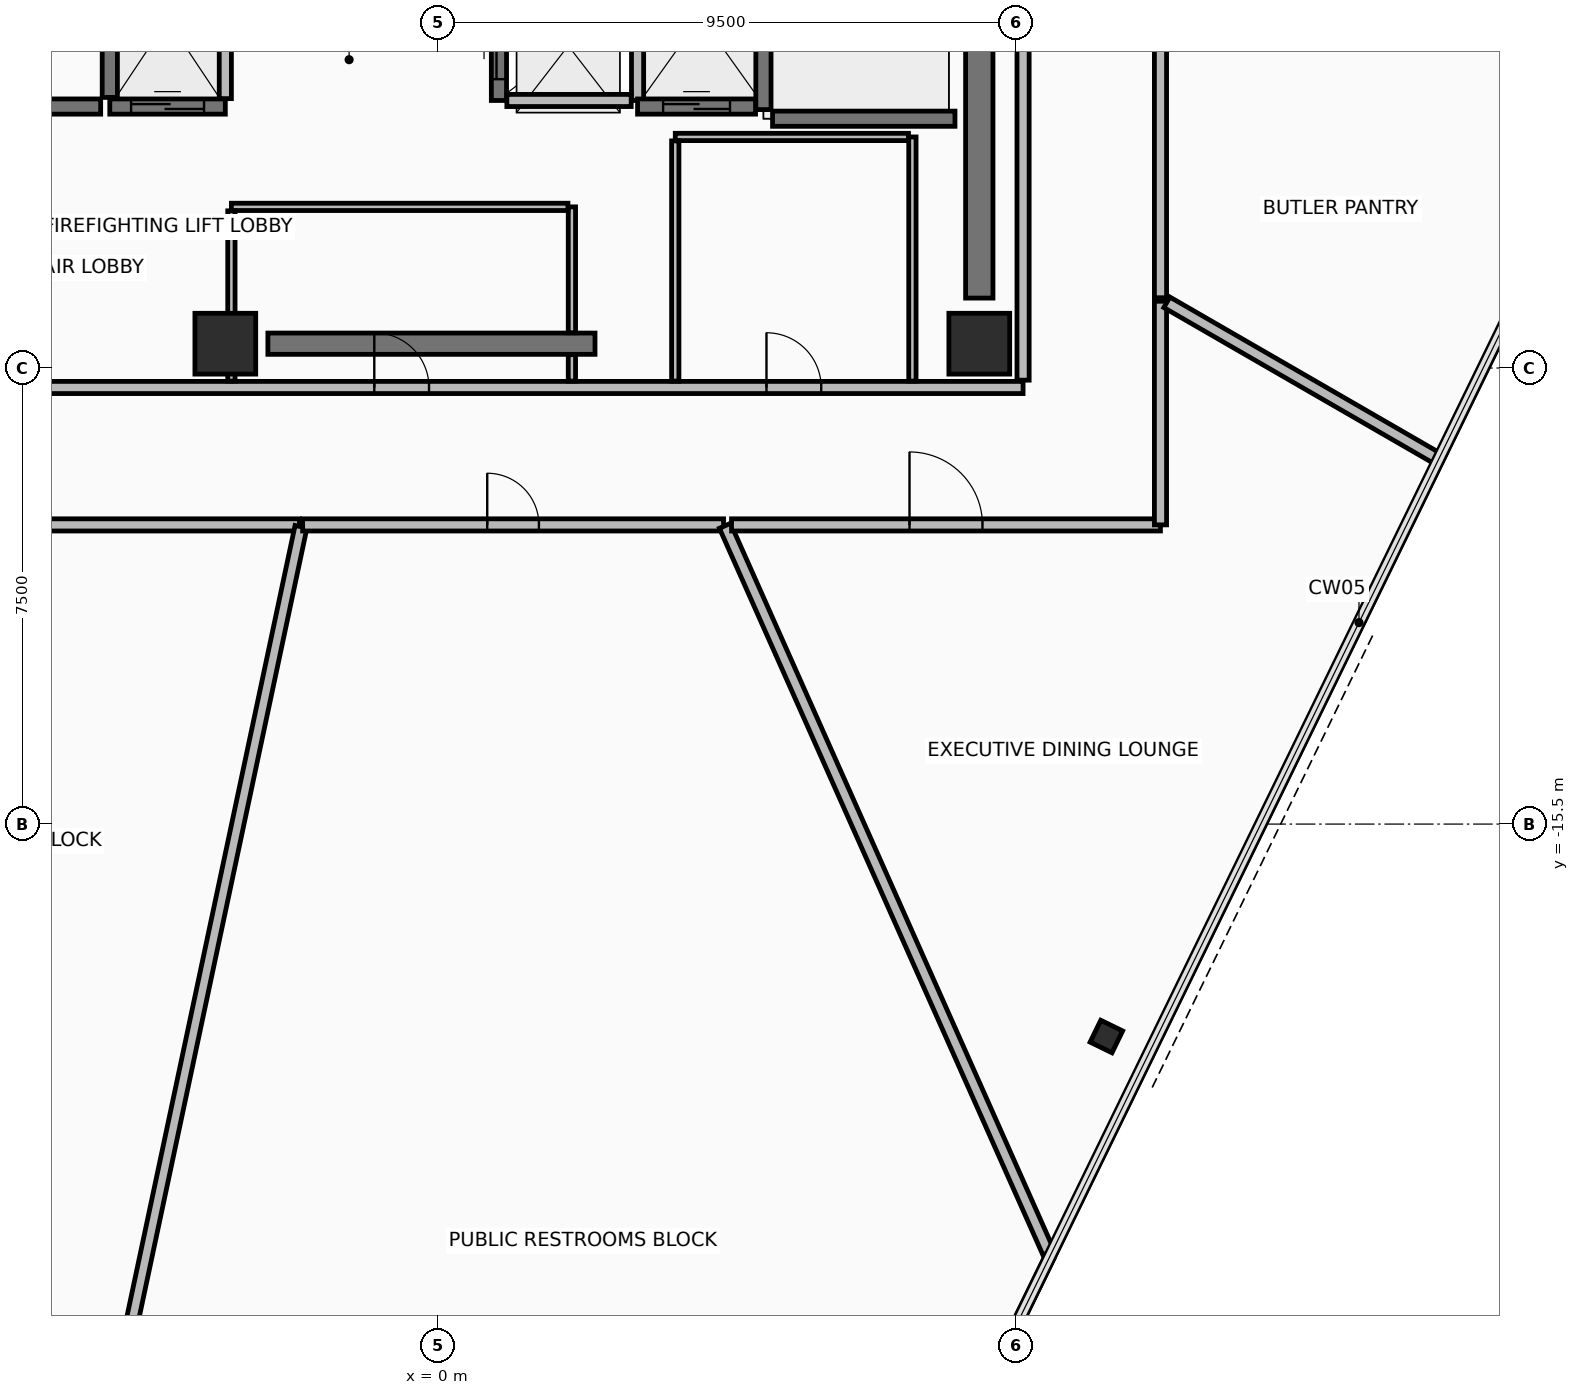
"""IFC4 building model, lengths in metres.
Left out: names, types, materials, properties, quantities, classifications, styles, units other than length and angle.
Written with IfcOpenShell. Run it as: python <this file> out.ifc"""

import sys

from ifc_helpers import new_model, si_unit, direction, frame, frame_2d, origin, origin_2d, place, context, subcontext, project, spatial, rectangle, hollow_rectangle, extrude, element, fill, save


model = new_model("IFC4")
c1 = context("Model", 3, precision=1e-05, world=origin(), true_north=direction((0.0, 1.0)))
c2 = subcontext(c1, "Body", "Model", "MODEL_VIEW")
j1 = project(units=[si_unit("LENGTHUNIT", "METRE"), si_unit("PLANEANGLEUNIT", "RADIAN")], contexts=[c1])
p1 = place(None, origin())
s1 = spatial("IfcSite", under=j1, at=p1, CompositionType="ELEMENT")
p2 = place(p1, origin())
s2 = spatial("IfcBuilding", under=s1, at=p2, CompositionType="ELEMENT")
p3 = place(p2, frame((0.0, 0.0, 260.6)))
s3 = spatial("IfcBuildingStorey", under=s2, at=p3, CompositionType="ELEMENT", Elevation=260.6)
for number, where, z_axis, x_axis in (
    (1, (-3.5, -7.6, 0.0), (0.0, 0.0, 1.0), (1.0, 0.0, 0.0)),
    (2, (8.9, -7.6, 0.0), (0.0, 0.0, 1.0), (1.0, 0.0, 0.0)),
):
    element("IfcColumn", number, at=place(p3, frame(where, z_axis=z_axis, x_axis=x_axis)), inside=s3, PredefinedType="COLUMN", context=c2, shape_type="SweptSolid", body=[
        extrude(rectangle(XDim=1.0, YDim=1.0, at=origin_2d()), origin(), (0.0, 0.0, 1.0), 3.6),
    ])
p4 = place(p3, frame((10.99, -18.994, 0.0), z_axis=(0.0, 0.0, 1.0), x_axis=(0.43837271548, 0.898793281196, 0.0)))
e3 = element("IfcColumn", 3, at=p4, inside=s3, PredefinedType="COLUMN", context=c2, shape_type="SweptSolid", body=[
    extrude(hollow_rectangle(XDim=0.4, YDim=0.4, WallThickness=0.025, at=origin_2d()), origin(), (0.0, 0.0, 1.0), 3.6),
])
p5 = place(p3, frame((-2.8, -7.6, 0.0), z_axis=(0.0, 0.0, 1.0), x_axis=(1.0, 0.0, 0.0)))
e4 = element("IfcWall", 4, at=p5, inside=s3, PredefinedType="SHEAR", context=c2, shape_type="SweptSolid", body=[
    extrude(rectangle(XDim=5.38, YDim=0.35, at=frame_2d((2.69, 0.0))), origin(), (0.0, 0.0, 1.0), 3.42),
])
p6 = place(p3, frame((8.9, -6.85, 0.0), z_axis=(0.0, 0.0, 1.0), x_axis=(0.0, 1.0, 0.0)))
e5 = element("IfcWall", 5, at=p6, inside=s3, PredefinedType="SHEAR", context=c2, shape_type="SweptSolid", body=[
    extrude(rectangle(XDim=10.7, YDim=0.45, at=frame_2d((5.35, 0.0))), origin(), (0.0, 0.0, 1.0), 3.42),
])
p7 = place(p3, frame((-9.62, -8.32, 0.0), z_axis=(0.0, 0.0, 1.0), x_axis=(1.0, 0.0, 0.0)))
e6 = element("IfcWall", 6, at=p7, inside=s3, PredefinedType="PARTITIONING", context=c2, shape_type="SweptSolid", body=[
    extrude(rectangle(XDim=19.24, YDim=0.2, at=frame_2d((9.62, 0.0))), origin(), (0.0, 0.0, 1.0), 2.915),
])
p8 = place(p7, frame((8.57, 0.0, 0.0)))
e7 = element("IfcOpeningElement", 7, at=p8, cuts=e6, PredefinedType="OPENING", context=c2, shape_type="SweptSolid", body=[
    extrude(rectangle(XDim=0.9, YDim=2.1, at=frame_2d((0.45, 1.05))), frame((0.0, 0.11, 0.0), z_axis=(0.0, -1.0, 0.0), x_axis=(1.0, 0.0, 0.0)), (0.0, 0.0, 1.0), 0.22),
])
p9 = place(p7, frame((15.02, 0.0, 0.0)))
e8 = element("IfcOpeningElement", 8, at=p9, cuts=e6, PredefinedType="OPENING", context=c2, shape_type="SweptSolid", body=[
    extrude(rectangle(XDim=0.9, YDim=2.1, at=frame_2d((0.45, 1.05))), frame((0.0, 0.11, 0.0), z_axis=(0.0, -1.0, 0.0), x_axis=(1.0, 0.0, 0.0)), (0.0, 0.0, 1.0), 0.22),
])
p10 = place(p3, frame((9.62, -8.2, 0.0), z_axis=(0.0, 0.0, 1.0), x_axis=(0.0, 1.0, 0.0)))
e9 = element("IfcWall", 9, at=p10, inside=s3, PredefinedType="PARTITIONING", context=c2, shape_type="SweptSolid", body=[
    extrude(rectangle(XDim=16.4, YDim=0.2, at=frame_2d((8.2, 0.0))), origin(), (0.0, 0.0, 1.0), 2.915),
])
p11 = place(p10, frame((12.65, 0.0, 0.0)))
e10 = element("IfcOpeningElement", 10, at=p11, cuts=e9, PredefinedType="OPENING", context=c2, shape_type="SweptSolid", body=[
    extrude(rectangle(XDim=1.1, YDim=2.15, at=frame_2d((0.55, 1.075))), frame((0.0, 0.11, 0.0), z_axis=(0.0, -1.0, 0.0), x_axis=(1.0, 0.0, 0.0)), (0.0, 0.0, 1.0), 0.22),
])
p12 = place(p3, frame((-5.4, -3.55, 0.0), z_axis=(0.0, 0.0, 1.0), x_axis=(0.0, 1.0, 0.0)))
e11 = element("IfcWall", 11, at=p12, inside=s3, PredefinedType="SHEAR", context=c2, shape_type="SweptSolid", body=[
    extrude(rectangle(XDim=7.3, YDim=0.25, at=frame_2d((3.65, 0.0))), origin(), (0.0, 0.0, 1.0), 3.42),
])
p13 = place(p3, frame((-8.5, -3.7, 0.0), z_axis=(0.0, 0.0, 1.0), x_axis=(1.0, 0.0, 0.0)))
e12 = element("IfcWall", 12, at=p13, inside=s3, PredefinedType="SHEAR", context=c2, shape_type="SweptSolid", body=[
    extrude(rectangle(XDim=2.95, YDim=0.25, at=frame_2d((1.475, 0.0))), origin(), (0.0, 0.0, 1.0), 3.42),
])
p14 = place(p13, frame((0.9, 0.0, 0.0)))
e13 = element("IfcOpeningElement", 13, at=p14, cuts=e12, PredefinedType="OPENING", context=c2, shape_type="SweptSolid", body=[
    extrude(rectangle(XDim=1.1, YDim=2.15, at=frame_2d((0.55, 1.075))), frame((0.0, 0.135, 0.0), z_axis=(0.0, -1.0, 0.0), x_axis=(1.0, 0.0, 0.0)), (0.0, 0.0, 1.0), 0.27),
])
p15 = place(p3, frame((5.35, -3.75, 0.0), z_axis=(0.0, 0.0, 1.0), x_axis=(0.0, 1.0, 0.0)))
e14 = element("IfcWall", 14, at=p15, inside=s3, PredefinedType="SHEAR", context=c2, shape_type="SweptSolid", body=[
    extrude(rectangle(XDim=7.3, YDim=0.25, at=frame_2d((3.65, 0.0))), origin(), (0.0, 0.0, 1.0), 3.42),
])
p16 = place(p3, frame((5.5, -3.9, 0.0), z_axis=(0.0, 0.0, 1.0), x_axis=(1.0, 0.0, 0.0)))
e15 = element("IfcWall", 15, at=p16, inside=s3, PredefinedType="SHEAR", context=c2, shape_type="SweptSolid", body=[
    extrude(rectangle(XDim=3.0, YDim=0.25, at=frame_2d((1.5, 0.0))), origin(), (0.0, 0.0, 1.0), 3.42),
])
p17 = place(p3, frame((1.0, -3.6, 0.0), z_axis=(0.0, 0.0, 1.0), x_axis=(0.0, 1.0, 0.0)))
e16 = element("IfcWall", 16, at=p17, inside=s3, PredefinedType="SHEAR", context=c2, shape_type="SweptSolid", body=[
    extrude(rectangle(XDim=1.8, YDim=0.25, at=frame_2d((0.9, 0.0))), origin(), (0.0, 0.0, 1.0), 3.42),
])
p18 = place(p17, frame((0.35, 0.0, 0.0)))
e17 = element("IfcOpeningElement", 17, at=p18, cuts=e16, PredefinedType="OPENING", context=c2, shape_type="SweptSolid", body=[
    extrude(rectangle(XDim=1.1, YDim=2.2, at=frame_2d((0.55, 1.1))), frame((0.0, 0.135, 0.0), z_axis=(0.0, -1.0, 0.0), x_axis=(1.0, 0.0, 0.0)), (0.0, 0.0, 1.0), 0.27),
])
p19 = place(p3, frame((3.28, -3.6, 0.0), z_axis=(0.0, 0.0, 1.0), x_axis=(0.0, 1.0, 0.0)))
e18 = element("IfcWall", 18, at=p19, inside=s3, PredefinedType="PARTITIONING", context=c2, shape_type="SweptSolid", body=[
    extrude(rectangle(XDim=1.8, YDim=0.2, at=frame_2d((0.9, 0.0))), origin(), (0.0, 0.0, 1.0), 3.42),
])
p20 = place(p3, frame((1.13, -3.6, 0.0), z_axis=(0.0, 0.0, 1.0), x_axis=(1.0, 0.0, 0.0)))
e19 = element("IfcWall", 19, at=p20, inside=s3, PredefinedType="PARTITIONING", context=c2, shape_type="SweptSolid", body=[
    extrude(rectangle(XDim=2.045, YDim=0.2, at=frame_2d((1.022, 0.0))), origin(), (0.0, 0.0, 1.0), 3.42),
])
p21 = place(p3, frame((-5.4, -3.7, 0.0), z_axis=(0.0, 0.0, 1.0), x_axis=(1.0, 0.0, 0.0)))
e20 = element("IfcWall", 20, at=p21, inside=s3, PredefinedType="SHEAR", context=c2, shape_type="SweptSolid", body=[
    extrude(rectangle(XDim=1.9, YDim=0.25, at=frame_2d((0.95, 0.0))), origin(), (0.0, 0.0, 1.0), 3.42),
])
p22 = place(p21, frame((0.35, 0.0, 0.0)))
e21 = element("IfcOpeningElement", 21, at=p22, cuts=e20, PredefinedType="OPENING", context=c2, shape_type="SweptSolid", body=[
    extrude(rectangle(XDim=1.2, YDim=2.2, at=frame_2d((0.6, 1.1))), frame((0.0, 0.135, 0.0), z_axis=(0.0, -1.0, 0.0), x_axis=(1.0, 0.0, 0.0)), (0.0, 0.0, 1.0), 0.27),
])
p23 = place(p3, frame((-3.5, -3.57, 0.0), z_axis=(0.0, 0.0, 1.0), x_axis=(0.0, 1.0, 0.0)))
e22 = element("IfcWall", 22, at=p23, inside=s3, PredefinedType="PARTITIONING", context=c2, shape_type="SweptSolid", body=[
    extrude(rectangle(XDim=2.615, YDim=0.2, at=frame_2d((1.308, 0.0))), origin(), (0.0, 0.0, 1.0), 3.42),
])
p24 = place(p3, frame((3.28, -3.7, 0.0), z_axis=(0.0, 0.0, 1.0), x_axis=(1.0, 0.0, 0.0)))
e23 = element("IfcWall", 23, at=p24, inside=s3, PredefinedType="SHEAR", context=c2, shape_type="SweptSolid", body=[
    extrude(rectangle(XDim=1.94, YDim=0.25, at=frame_2d((0.97, 0.0))), origin(), (0.0, 0.0, 1.0), 3.42),
])
p25 = place(p24, frame((0.42, 0.0, 0.0)))
e24 = element("IfcOpeningElement", 24, at=p25, cuts=e23, PredefinedType="OPENING", context=c2, shape_type="SweptSolid", body=[
    extrude(rectangle(XDim=1.1, YDim=2.2, at=frame_2d((0.55, 1.1))), frame((0.0, 0.135, 0.0), z_axis=(0.0, -1.0, 0.0), x_axis=(1.0, 0.0, 0.0)), (0.0, 0.0, 1.0), 0.27),
])
p26 = place(p3, frame((2.2, -8.215, 0.0), z_axis=(0.0, 0.0, 1.0), x_axis=(0.0, 1.0, 0.0)))
e25 = element("IfcWall", 25, at=p26, inside=s3, PredefinedType="PARTITIONING", context=c2, shape_type="SweptSolid", body=[
    extrude(rectangle(XDim=0.435, YDim=0.12, at=frame_2d((0.218, 0.0))), origin(), (0.0, 0.0, 1.0), 2.715),
])
p27 = place(p3, frame((2.2, -7.42, 0.0), z_axis=(0.0, 0.0, 1.0), x_axis=(0.0, 1.0, 0.0)))
e26 = element("IfcWall", 26, at=p27, inside=s3, PredefinedType="PARTITIONING", context=c2, shape_type="SweptSolid", body=[
    extrude(rectangle(XDim=2.07, YDim=0.12, at=frame_2d((1.035, 0.0))), origin(), (0.0, 0.0, 1.0), 2.715),
])
p28 = place(p3, frame((2.135, -5.35, 0.0), z_axis=(0.0, 0.0, 1.0), x_axis=(-1.0, 0.0, 0.0)))
e27 = element("IfcWall", 27, at=p28, inside=s3, PredefinedType="PARTITIONING", context=c2, shape_type="SweptSolid", body=[
    extrude(rectangle(XDim=5.535, YDim=0.12, at=frame_2d((2.768, 0.0))), origin(), (0.0, 0.0, 1.0), 2.715),
])
p29 = place(p3, frame((-3.4, -5.415, 0.0), z_axis=(0.0, 0.0, 1.0), x_axis=(0.0, -1.0, 0.0)))
e28 = element("IfcWall", 28, at=p29, inside=s3, PredefinedType="PARTITIONING", context=c2, shape_type="SweptSolid", body=[
    extrude(rectangle(XDim=2.8, YDim=0.12, at=frame_2d((1.4, 0.0))), origin(), (0.0, 0.0, 1.0), 2.715),
])
p30 = place(p3, frame((7.8, -8.215, 0.0), z_axis=(0.0, 0.0, 1.0), x_axis=(0.0, 1.0, 0.0)))
e29 = element("IfcWall", 29, at=p30, inside=s3, PredefinedType="PARTITIONING", context=c2, shape_type="SweptSolid", body=[
    extrude(rectangle(XDim=4.015, YDim=0.12, at=frame_2d((2.008, 0.0))), origin(), (0.0, 0.0, 1.0), 2.715),
])
p31 = place(p3, frame((7.735, -4.2, 0.0), z_axis=(0.0, 0.0, 1.0), x_axis=(-1.0, 0.0, 0.0)))
e30 = element("IfcWall", 30, at=p31, inside=s3, PredefinedType="PARTITIONING", context=c2, shape_type="SweptSolid", body=[
    extrude(rectangle(XDim=3.835, YDim=0.12, at=frame_2d((1.917, 0.0))), origin(), (0.0, 0.0, 1.0), 3.42),
])
p32 = place(p3, frame((3.9, -4.265, 0.0), z_axis=(0.0, 0.0, 1.0), x_axis=(0.0, -1.0, 0.0)))
e31 = element("IfcWall", 31, at=p32, inside=s3, PredefinedType="PARTITIONING", context=c2, shape_type="SweptSolid", body=[
    extrude(rectangle(XDim=3.95, YDim=0.12, at=frame_2d((1.975, 0.0))), origin(), (0.0, 0.0, 1.0), 2.715),
])
p33 = place(p3, frame((-11.741, -10.58, 0.0), z_axis=(0.0, 0.0, 1.0), x_axis=(1.0, 0.0, 0.0)))
e32 = element("IfcWall", 32, at=p33, inside=s3, PredefinedType="PARTITIONING", context=c2, shape_type="SweptSolid", body=[
    extrude(rectangle(XDim=9.461, YDim=0.2, at=frame_2d((4.73, 0.0))), origin(), (0.0, 0.0, 1.0), 2.915),
])
p34 = place(p33, frame((4.306, 0.0, 0.0)))
e33 = element("IfcOpeningElement", 33, at=p34, cuts=e32, PredefinedType="OPENING", context=c2, shape_type="SweptSolid", body=[
    extrude(rectangle(XDim=0.85, YDim=2.1, at=frame_2d((0.425, 1.05))), frame((0.0, 0.11, 0.0), z_axis=(0.0, -1.0, 0.0), x_axis=(1.0, 0.0, 0.0)), (0.0, 0.0, 1.0), 0.22),
])
p35 = place(p3, frame((-2.255, -10.61, 0.0), z_axis=(0.0, 0.0, 1.0), x_axis=(-0.207902262157, -0.97814960481, 0.0)))
e34 = element("IfcWall", 34, at=p35, inside=s3, PredefinedType="PARTITIONING", context=c2, shape_type="SweptSolid", body=[
    extrude(rectangle(XDim=16.309, YDim=0.2, at=frame_2d((8.154, 0.0))), origin(), (0.0, 0.0, 1.0), 2.765),
])
p36 = place(p3, frame((-5.728, -26.441, 0.0), z_axis=(0.0, 0.0, 1.0), x_axis=(-0.559188397691, 0.829040611724, 0.0)))
e35 = element("IfcWall", 35, at=p36, inside=s3, PredefinedType="PARTITIONING", context=c2, shape_type="SweptSolid", body=[
    extrude(rectangle(XDim=15.951, YDim=0.15, at=frame_2d((7.976, 0.0))), origin(), (0.0, 0.0, 1.0), 3.42),
])
p37 = place(p3, frame((-2.229, -10.58, 0.0), z_axis=(0.0, 0.0, 1.0), x_axis=(1.0, 0.0, 0.0)))
e36 = element("IfcWall", 36, at=p37, inside=s3, PredefinedType="PARTITIONING", context=c2, shape_type="SweptSolid", body=[
    extrude(rectangle(XDim=6.923, YDim=0.2, at=frame_2d((3.461, 0.0))), origin(), (0.0, 0.0, 1.0), 3.42),
])
p38 = place(p37, frame((3.036, 0.0, 0.0)))
e37 = element("IfcOpeningElement", 37, at=p38, cuts=e36, PredefinedType="OPENING", context=c2, shape_type="SweptSolid", body=[
    extrude(rectangle(XDim=0.85, YDim=2.1, at=frame_2d((0.425, 1.05))), frame((0.0, 0.11, 0.0), z_axis=(0.0, -1.0, 0.0), x_axis=(1.0, 0.0, 0.0)), (0.0, 0.0, 1.0), 0.22),
])
p39 = place(p3, frame((4.717, -10.595, 0.0), z_axis=(0.0, 0.0, 1.0), x_axis=(0.406740308305, -0.913543825769, 0.0)))
e38 = element("IfcWall", 38, at=p39, inside=s3, PredefinedType="PARTITIONING", context=c2, shape_type="SweptSolid", body=[
    extrude(rectangle(XDim=13.134, YDim=0.2, at=frame_2d((6.567, 0.0))), origin(), (0.0, 0.0, 1.0), 2.765),
])
p40 = place(p3, frame((10.059, -22.614, 0.0), z_axis=(0.0, 0.0, 1.0), x_axis=(-0.438368087018, -0.898795538643, 0.0)))
e39 = element("IfcWall", 39, at=p40, inside=s3, PredefinedType="PARTITIONING", context=c2, shape_type="SweptSolid", body=[
    extrude(rectangle(XDim=13.336, YDim=0.15, at=frame_2d((6.668, 0.0))), origin(), (0.0, 0.0, 1.0), 3.42),
])
p41 = place(p3, frame((4.825, -10.58, 0.0), z_axis=(0.0, 0.0, 1.0), x_axis=(1.0, 0.0, 0.0)))
e40 = element("IfcWall", 40, at=p41, inside=s3, PredefinedType="PARTITIONING", context=c2, shape_type="SweptSolid", body=[
    extrude(rectangle(XDim=7.054, YDim=0.2, at=frame_2d((3.527, 0.0))), origin(), (0.0, 0.0, 1.0), 2.915),
])
p42 = place(p41, frame((2.927, 0.0, 0.0)))
e41 = element("IfcOpeningElement", 41, at=p42, cuts=e40, PredefinedType="OPENING", context=c2, shape_type="SweptSolid", body=[
    extrude(rectangle(XDim=1.2, YDim=2.15, at=frame_2d((0.6, 1.075))), frame((0.0, 0.11, 0.0), z_axis=(0.0, -1.0, 0.0), x_axis=(1.0, 0.0, 0.0)), (0.0, 0.0, 1.0), 0.22),
])
p43 = place(p3, frame((11.88, -10.579, 0.0), z_axis=(0.0, 0.0, 1.0), x_axis=(0.0, 1.0, 0.0)))
e42 = element("IfcWall", 42, at=p43, inside=s3, PredefinedType="PARTITIONING", context=c2, shape_type="SweptSolid", body=[
    extrude(rectangle(XDim=3.677, YDim=0.2, at=frame_2d((1.839, 0.0))), origin(), (0.0, 0.0, 1.0), 3.115),
])
p44 = place(p3, frame((11.985, -6.92, 0.0), z_axis=(0.0, 0.0, 1.0), x_axis=(0.866041575714, -0.49997198835, 0.0)))
e43 = element("IfcWall", 43, at=p44, inside=s3, PredefinedType="PARTITIONING", context=c2, shape_type="SweptSolid", body=[
    extrude(rectangle(XDim=5.138, YDim=0.2, at=frame_2d((2.569, 0.0))), origin(), (0.0, 0.0, 1.0), 2.765),
])
p45 = place(p3, frame((11.88, -6.844, 0.0), z_axis=(0.0, 0.0, 1.0), x_axis=(0.0, 1.0, 0.0)))
e44 = element("IfcWall", 44, at=p45, inside=s3, PredefinedType="PARTITIONING", context=c2, shape_type="SweptSolid", body=[
    extrude(rectangle(XDim=4.719, YDim=0.2, at=frame_2d((2.36, 0.0))), origin(), (0.0, 0.0, 1.0), 2.915),
])
p46 = place(p18, origin())
e45 = element("IfcDoor", 45, at=p46, inside=s3, OperationType="SLIDING_TO_LEFT", PredefinedType="DOOR", context=c2, shape_type="SweptSolid", body=[
    extrude(rectangle(XDim=1.1, YDim=2.2, at=frame_2d((0.55, 1.1))), frame((0.0, 0.025, 0.0), z_axis=(0.0, -1.0, 0.0), x_axis=(1.0, 0.0, 0.0)), (0.0, 0.0, 1.0), 0.05),
])
fill(e17, e45)
p47 = place(p22, origin())
e46 = element("IfcDoor", 46, at=p47, inside=s3, OperationType="SLIDING_TO_RIGHT", PredefinedType="DOOR", context=c2, shape_type="SweptSolid", body=[
    extrude(rectangle(XDim=1.2, YDim=2.2, at=frame_2d((0.6, 1.1))), frame((0.0, 0.025, 0.0), z_axis=(0.0, -1.0, 0.0), x_axis=(1.0, 0.0, 0.0)), (0.0, 0.0, 1.0), 0.05),
])
fill(e21, e46)
p48 = place(p25, origin())
e47 = element("IfcDoor", 47, at=p48, inside=s3, OperationType="SLIDING_TO_LEFT", PredefinedType="DOOR", context=c2, shape_type="SweptSolid", body=[
    extrude(rectangle(XDim=1.1, YDim=2.2, at=frame_2d((0.55, 1.1))), frame((0.0, 0.025, 0.0), z_axis=(0.0, -1.0, 0.0), x_axis=(1.0, 0.0, 0.0)), (0.0, 0.0, 1.0), 0.05),
])
fill(e24, e47)
p49 = place(p8, origin())
e48 = element("IfcDoor", 48, at=p49, inside=s3, OperationType="SINGLE_SWING_LEFT", PredefinedType="DOOR", context=c2, shape_type="SweptSolid", body=[
    extrude(rectangle(XDim=0.9, YDim=2.1, at=frame_2d((0.45, 1.05))), frame((0.0, 0.025, 0.0), z_axis=(0.0, -1.0, 0.0), x_axis=(1.0, 0.0, 0.0)), (0.0, 0.0, 1.0), 0.05),
])
fill(e7, e48)
p50 = place(p9, origin())
e49 = element("IfcDoor", 49, at=p50, inside=s3, OperationType="SINGLE_SWING_LEFT", PredefinedType="DOOR", context=c2, shape_type="SweptSolid", body=[
    extrude(rectangle(XDim=0.9, YDim=2.1, at=frame_2d((0.45, 1.05))), frame((0.0, 0.025, 0.0), z_axis=(0.0, -1.0, 0.0), x_axis=(1.0, 0.0, 0.0)), (0.0, 0.0, 1.0), 0.05),
])
fill(e8, e49)
p51 = place(p38, origin())
e50 = element("IfcDoor", 50, at=p51, inside=s3, OperationType="SINGLE_SWING_RIGHT", PredefinedType="DOOR", context=c2, shape_type="SweptSolid", body=[
    extrude(rectangle(XDim=0.85, YDim=2.1, at=frame_2d((0.425, 1.05))), frame((0.0, 0.025, 0.0), z_axis=(0.0, -1.0, 0.0), x_axis=(1.0, 0.0, 0.0)), (0.0, 0.0, 1.0), 0.05),
])
fill(e37, e50)
p52 = place(p42, origin())
e51 = element("IfcDoor", 51, at=p52, inside=s3, OperationType="SINGLE_SWING_LEFT", PredefinedType="DOOR", context=c2, shape_type="SweptSolid", body=[
    extrude(rectangle(XDim=1.2, YDim=2.15, at=frame_2d((0.6, 1.075))), frame((0.0, 0.025, 0.0), z_axis=(0.0, -1.0, 0.0), x_axis=(1.0, 0.0, 0.0)), (0.0, 0.0, 1.0), 0.05),
])
fill(e41, e51)
save(model, sys.argv[1])
